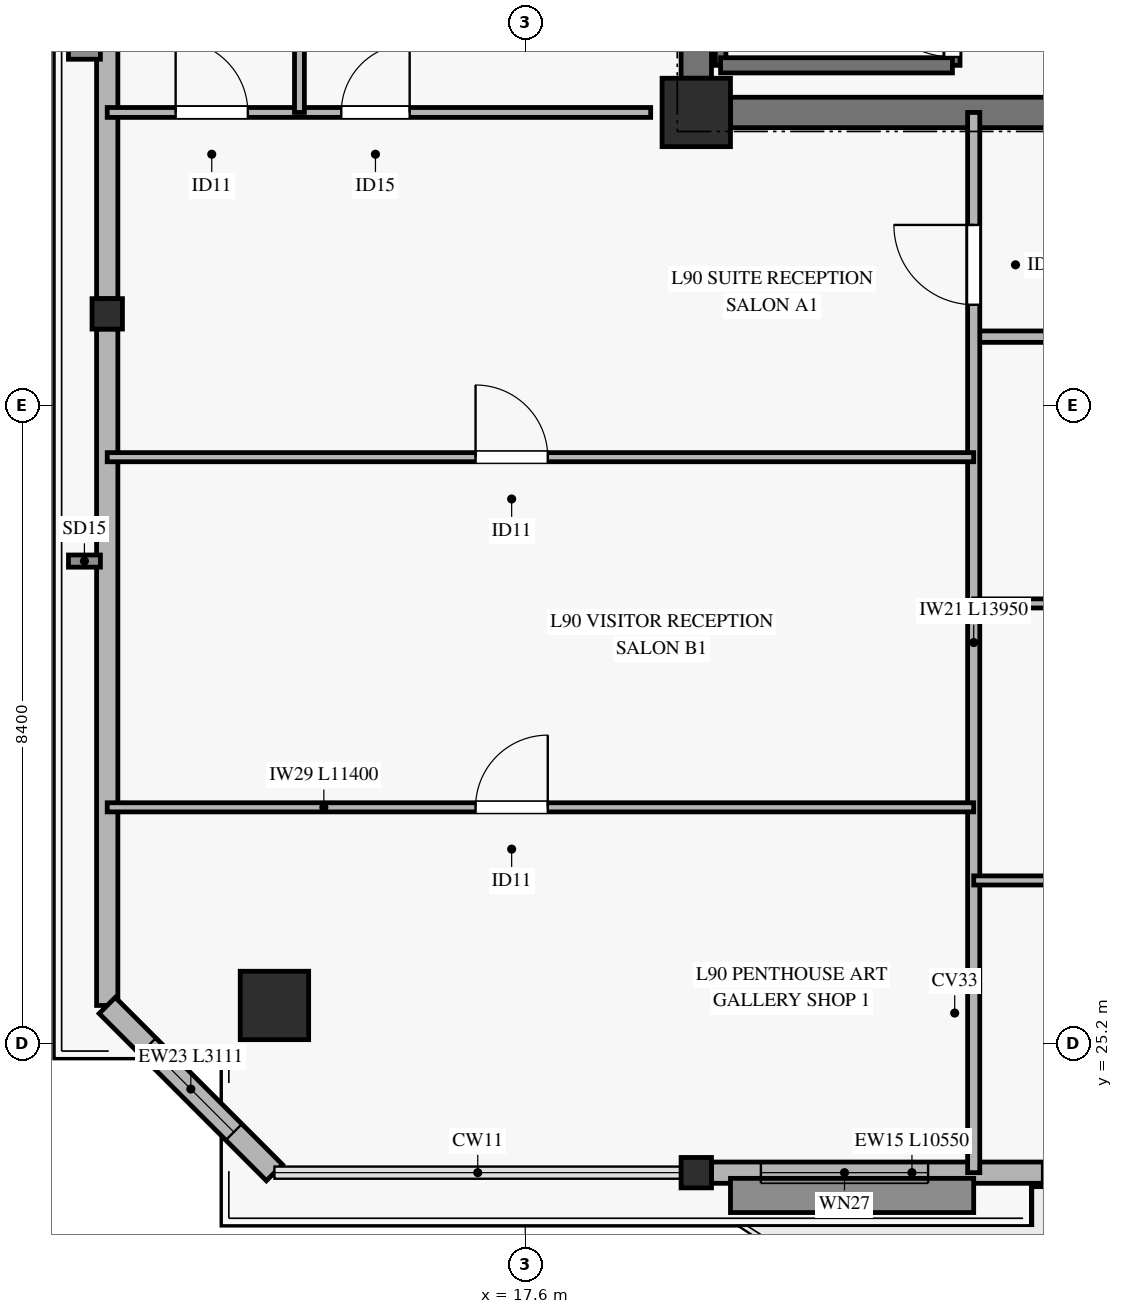
"""IFC4 building model, lengths in metres.
Left out: names, types, materials, properties, quantities, classifications, styles, units other than length and angle.
Written with IfcOpenShell. Run it as: python <this file> out.ifc"""

import sys

from ifc_helpers import new_model, si_unit, direction, frame, frame_2d, origin, origin_2d, place, context, subcontext, project, spatial, rectangle, hollow_rectangle, extrude, source, transform, mapped, element, fill, save


model = new_model("IFC4")
c1 = context("Model", 3, precision=1e-05, world=origin(), true_north=direction((0.0, 1.0)))
c2 = subcontext(c1, "Body", "Model", "MODEL_VIEW")
j1 = project(units=[si_unit("LENGTHUNIT", "METRE"), si_unit("PLANEANGLEUNIT", "RADIAN")], contexts=[c1])
p1 = place(None, origin())
s1 = spatial("IfcSite", under=j1, at=p1, CompositionType="ELEMENT")
p2 = place(p1, origin())
s2 = spatial("IfcBuilding", under=s1, at=p2, CompositionType="ELEMENT")
p3 = place(p2, frame((0.0, 0.0, 345.9)))
s3 = spatial("IfcBuildingStorey", under=s2, at=p3, CompositionType="ELEMENT", Elevation=345.9)
m1 = source(origin(), c2, "Body", "SweptSolid", [
    extrude(rectangle(XDim=0.9, YDim=0.9, at=origin_2d()), origin(), (0.0, 0.0, 1.0), 3.185),
])
p4 = place(p3, frame((19.85, 37.45, 0.0), z_axis=(0.0, 0.0, 1.0), x_axis=(1.0, 0.0, 0.0)))
e1 = element("IfcColumn", 1, at=p4, inside=s3, PredefinedType="PILASTER", context=c2, shape_type="MappedRepresentation", body=[
    mapped(m1, transform((0.0, 0.0, 0.0), x_axis=(1.0, 0.0, 0.0), y_axis=(0.0, 1.0, 0.0), z_axis=(0.0, 0.0, 1.0), scale=1.0)),
])
p5 = place(p3, frame((20.3, 37.45, 0.0), z_axis=(0.0, 0.0, 1.0), x_axis=(1.0, 0.0, 0.0)))
e2 = element("IfcWall", 2, at=p5, inside=s3, PredefinedType="SHEAR", context=c2, shape_type="SweptSolid", body=[
    extrude(rectangle(XDim=10.05, YDim=0.4, at=frame_2d((5.025, 0.0))), origin(), (0.0, 0.0, 1.0), 3.185),
])
p6 = place(p5, frame((4.25, 0.0, 0.0)))
e3 = element("IfcOpeningElement", 3, at=p6, cuts=e2, PredefinedType="OPENING", context=c2, shape_type="SweptSolid", body=[
    extrude(rectangle(XDim=1.2, YDim=2.15, at=frame_2d((0.6, 1.075))), frame((0.0, 0.21, 0.0), z_axis=(0.0, -1.0, 0.0), x_axis=(1.0, 0.0, 0.0)), (0.0, 0.0, 1.0), 0.42),
])
p7 = place(p3, frame((19.85, 37.9, 0.0), z_axis=(0.0, 0.0, 1.0), x_axis=(0.0, 1.0, 0.0)))
e4 = element("IfcWall", 4, at=p7, inside=s3, PredefinedType="SHEAR", context=c2, shape_type="SweptSolid", body=[
    extrude(rectangle(XDim=8.2, YDim=0.4, at=frame_2d((4.1, 0.0))), origin(), (0.0, 0.0, 1.0), 3.185),
])
m2 = source(origin(), c2, "Body", "SweptSolid", [
    extrude(hollow_rectangle(XDim=0.9, YDim=0.9, WallThickness=0.04, at=origin_2d()), origin(), (0.0, 0.0, 1.0), 3.185),
])
p8 = place(p3, frame((14.3, 25.7, 0.0), z_axis=(0.0, 0.0, 1.0), x_axis=(1.0, 0.0, 0.0)))
e5 = element("IfcColumn", 5, at=p8, inside=s3, PredefinedType="COLUMN", context=c2, shape_type="MappedRepresentation", body=[
    mapped(m2, transform((0.0, 0.0, 0.0), x_axis=(1.0, 0.0, 0.0), y_axis=(0.0, 1.0, 0.0), z_axis=(0.0, 0.0, 1.0), scale=1.0)),
])
m3 = source(origin(), c2, "Body", "SweptSolid", [
    extrude(hollow_rectangle(XDim=0.4, YDim=0.4, WallThickness=0.02, at=origin_2d()), origin(), (0.0, 0.0, 1.0), 3.185),
])
for number, where, z_axis, x_axis in (
    (6, (19.85, 23.5, 0.0), (0.0, 0.0, 1.0), (1.0, 0.0, 0.0)),
    (7, (12.1, 34.8, 0.0), (0.0, 0.0, 1.0), (1.0, 0.0, 0.0)),
):
    element("IfcColumn", number, at=place(p3, frame(where, z_axis=z_axis, x_axis=x_axis)), inside=s3, PredefinedType="COLUMN", context=c2, shape_type="MappedRepresentation", body=[
        mapped(m3, transform((0.0, 0.0, 0.0), x_axis=(1.0, 0.0, 0.0), y_axis=(0.0, 1.0, 0.0), z_axis=(0.0, 0.0, 1.0), scale=1.0)),
    ])
p9 = place(p3, frame((20.05, 23.5, 0.0), z_axis=(0.0, 0.0, 1.0), x_axis=(1.0, 0.0, 0.0)))
e8 = element("IfcWall", 8, at=p9, inside=s3, PredefinedType="SOLIDWALL", context=c2, shape_type="SweptSolid", body=[
    extrude(rectangle(XDim=10.55, YDim=0.28, at=frame_2d((5.275, 0.0))), origin(), (0.0, 0.0, 1.0), 2.815),
])
p10 = place(p9, frame((4.35, 0.0, 0.0)))
e9 = element("IfcOpeningElement", 9, at=p10, cuts=e8, PredefinedType="OPENING", context=c2, shape_type="SweptSolid", body=[
    extrude(rectangle(XDim=1.8, YDim=2.25, at=frame_2d((0.9, 1.125))), frame((0.0, 0.15, 0.0), z_axis=(0.0, -1.0, 0.0), x_axis=(1.0, 0.0, 0.0)), (0.0, 0.0, 1.0), 0.3),
])
p11 = place(p9, frame((0.65, 0.0, 0.45)))
e10 = element("IfcOpeningElement", 10, at=p11, cuts=e8, PredefinedType="OPENING", context=c2, shape_type="SweptSolid", body=[
    extrude(rectangle(XDim=2.2, YDim=2.1, at=frame_2d((1.1, 1.05))), frame((0.0, 0.15, 0.0), z_axis=(0.0, -1.0, 0.0), x_axis=(1.0, 0.0, 0.0)), (0.0, 0.0, 1.0), 0.3),
])
p12 = place(p9, frame((7.35, 0.0, 0.45)))
e11 = element("IfcOpeningElement", 11, at=p12, cuts=e8, PredefinedType="OPENING", context=c2, shape_type="SweptSolid", body=[
    extrude(rectangle(XDim=1.6, YDim=2.0, at=frame_2d((0.8, 1.0))), frame((0.0, 0.15, 0.0), z_axis=(0.0, -1.0, 0.0), x_axis=(1.0, 0.0, 0.0)), (0.0, 0.0, 1.0), 0.3),
])
p13 = place(p3, frame((12.1, 25.7, 0.0), z_axis=(0.0, 0.0, 1.0), x_axis=(0.0, 1.0, 0.0)))
e12 = element("IfcWall", 12, at=p13, inside=s3, PredefinedType="SOLIDWALL", context=c2, shape_type="SweptSolid", body=[
    extrude(rectangle(XDim=8.9, YDim=0.28, at=frame_2d((4.45, 0.0))), origin(), (0.0, 0.0, 1.0), 2.815),
])
p14 = place(p3, frame((12.1, 35.0, 0.0), z_axis=(0.0, 0.0, 1.0), x_axis=(0.0, 1.0, 0.0)))
e13 = element("IfcWall", 13, at=p14, inside=s3, PredefinedType="SOLIDWALL", context=c2, shape_type="SweptSolid", body=[
    extrude(rectangle(XDim=8.9, YDim=0.28, at=frame_2d((4.45, 0.0))), origin(), (0.0, 0.0, 1.0), 2.815),
])
p15 = place(p14, frame((3.35, 0.0, 0.45)))
e14 = element("IfcOpeningElement", 14, at=p15, cuts=e13, PredefinedType="OPENING", context=c2, shape_type="SweptSolid", body=[
    extrude(rectangle(XDim=2.2, YDim=2.1, at=frame_2d((1.1, 1.05))), frame((0.0, 0.15, 0.0), z_axis=(0.0, -1.0, 0.0), x_axis=(1.0, 0.0, 0.0)), (0.0, 0.0, 1.0), 0.3),
])
p16 = place(p3, frame((12.1, 25.7, 0.0), z_axis=(0.0, 0.0, 1.0), x_axis=(0.707106781187, -0.707106781187, 0.0)))
e15 = element("IfcWall", 15, at=p16, inside=s3, PredefinedType="SOLIDWALL", context=c2, shape_type="SweptSolid", body=[
    extrude(rectangle(XDim=3.111, YDim=0.3, at=frame_2d((1.556, 0.0))), origin(), (0.0, 0.0, 1.0), 2.815),
])
p17 = place(p16, frame((0.756, 0.0, 0.45)))
e16 = element("IfcOpeningElement", 16, at=p17, cuts=e15, PredefinedType="OPENING", context=c2, shape_type="SweptSolid", body=[
    extrude(rectangle(XDim=1.6, YDim=2.0, at=frame_2d((0.8, 1.0))), frame((0.0, 0.16, 0.0), z_axis=(0.0, -1.0, 0.0), x_axis=(1.0, 0.0, 0.0)), (0.0, 0.0, 1.0), 0.32),
])
p18 = place(p3, frame((20.17, 38.07, 0.0), z_axis=(0.0, 0.0, 1.0), x_axis=(0.0, 1.0, 0.0)))
e17 = element("IfcWall", 17, at=p18, inside=s3, PredefinedType="SOLIDWALL", context=c2, shape_type="SweptSolid", body=[
    extrude(rectangle(XDim=7.25, YDim=0.14, at=frame_2d((3.625, 0.0))), origin(), (0.0, 0.0, 1.0), 3.4),
])
p19 = place(p3, frame((23.22, 38.07, 0.0), z_axis=(0.0, 0.0, 1.0), x_axis=(0.0, 1.0, 0.0)))
e18 = element("IfcWall", 18, at=p19, inside=s3, PredefinedType="SOLIDWALL", context=c2, shape_type="SweptSolid", body=[
    extrude(rectangle(XDim=7.25, YDim=0.2, at=frame_2d((3.625, 0.0))), origin(), (0.0, 0.0, 1.0), 3.4),
])
p20 = place(p19, frame((0.11, 0.0, 0.0)))
e19 = element("IfcOpeningElement", 19, at=p20, cuts=e18, PredefinedType="OPENING", context=c2, shape_type="SweptSolid", body=[
    extrude(rectangle(XDim=1.1, YDim=2.15, at=frame_2d((0.55, 1.075))), frame((0.0, 0.11, 0.0), z_axis=(0.0, -1.0, 0.0), x_axis=(1.0, 0.0, 0.0)), (0.0, 0.0, 1.0), 0.22),
])
p21 = place(p3, frame((20.17, 38.07, 0.0), z_axis=(0.0, 0.0, 1.0), x_axis=(1.0, 0.0, 0.0)))
e20 = element("IfcWall", 20, at=p21, inside=s3, PredefinedType="SOLIDWALL", context=c2, shape_type="SweptSolid", body=[
    extrude(rectangle(XDim=3.05, YDim=0.2, at=frame_2d((1.525, 0.0))), origin(), (0.0, 0.0, 1.0), 3.4),
])
p22 = place(p3, frame((23.5, 34.5, 0.0), z_axis=(0.0, 0.0, 1.0), x_axis=(1.0, 0.0, 0.0)))
e21 = element("IfcWall", 21, at=p22, inside=s3, PredefinedType="PARTITIONING", context=c2, shape_type="SweptSolid", body=[
    extrude(rectangle(XDim=20.8, YDim=0.15, at=frame_2d((10.4, 0.0))), origin(), (0.0, 0.0, 1.0), 2.47),
])
p23 = place(p22, frame((4.767, 0.0, 0.0)))
e22 = element("IfcOpeningElement", 22, at=p23, cuts=e21, PredefinedType="OPENING", context=c2, shape_type="SweptSolid", body=[
    extrude(rectangle(XDim=1.05, YDim=2.15, at=frame_2d((0.525, 1.075))), frame((0.0, 0.085, 0.0), z_axis=(0.0, -1.0, 0.0), x_axis=(1.0, 0.0, 0.0)), (0.0, 0.0, 1.0), 0.17),
])
p24 = place(p22, frame((16.025, 0.0, 0.0)))
e23 = element("IfcOpeningElement", 23, at=p24, cuts=e21, PredefinedType="OPENING", context=c2, shape_type="SweptSolid", body=[
    extrude(rectangle(XDim=1.05, YDim=2.15, at=frame_2d((0.525, 1.075))), frame((0.0, 0.085, 0.0), z_axis=(0.0, -1.0, 0.0), x_axis=(1.0, 0.0, 0.0)), (0.0, 0.0, 1.0), 0.17),
])
p25 = place(p3, frame((23.5, 23.5, 0.0), z_axis=(0.0, 0.0, 1.0), x_axis=(0.0, 1.0, 0.0)))
e24 = element("IfcWall", 24, at=p25, inside=s3, PredefinedType="PARTITIONING", context=c2, shape_type="SweptSolid", body=[
    extrude(rectangle(XDim=13.95, YDim=0.16, at=frame_2d((6.975, 0.0))), origin(), (0.0, 0.0, 1.0), 2.77),
])
p26 = place(p25, frame((11.42, 0.0, 0.0)))
e25 = element("IfcOpeningElement", 25, at=p26, cuts=e24, PredefinedType="OPENING", context=c2, shape_type="SweptSolid", body=[
    extrude(rectangle(XDim=1.05, YDim=2.15, at=frame_2d((0.525, 1.075))), frame((0.0, 0.09, 0.0), z_axis=(0.0, -1.0, 0.0), x_axis=(1.0, 0.0, 0.0)), (0.0, 0.0, 1.0), 0.18),
])
p27 = place(p3, frame((12.1, 28.307, 0.0), z_axis=(0.0, 0.0, 1.0), x_axis=(1.0, 0.0, 0.0)))
e26 = element("IfcWall", 26, at=p27, inside=s3, PredefinedType="PARTITIONING", context=c2, shape_type="SweptSolid", body=[
    extrude(rectangle(XDim=11.4, YDim=0.12, at=frame_2d((5.7, 0.0))), origin(), (0.0, 0.0, 1.0), 2.47),
])
p28 = place(p27, frame((4.846, 0.0, 0.0)))
e27 = element("IfcOpeningElement", 27, at=p28, cuts=e26, PredefinedType="OPENING", context=c2, shape_type="SweptSolid", body=[
    extrude(rectangle(XDim=0.95, YDim=2.1, at=frame_2d((0.475, 1.05))), frame((0.0, 0.07, 0.0), z_axis=(0.0, -1.0, 0.0), x_axis=(1.0, 0.0, 0.0)), (0.0, 0.0, 1.0), 0.14),
])
p29 = place(p3, frame((12.1, 32.914, 0.0), z_axis=(0.0, 0.0, 1.0), x_axis=(1.0, 0.0, 0.0)))
e28 = element("IfcWall", 28, at=p29, inside=s3, PredefinedType="PARTITIONING", context=c2, shape_type="SweptSolid", body=[
    extrude(rectangle(XDim=11.4, YDim=0.12, at=frame_2d((5.7, 0.0))), origin(), (0.0, 0.0, 1.0), 2.47),
])
p30 = place(p29, frame((4.846, 0.0, 0.0)))
e29 = element("IfcOpeningElement", 29, at=p30, cuts=e28, PredefinedType="OPENING", context=c2, shape_type="SweptSolid", body=[
    extrude(rectangle(XDim=0.95, YDim=2.1, at=frame_2d((0.475, 1.05))), frame((0.0, 0.07, 0.0), z_axis=(0.0, -1.0, 0.0), x_axis=(1.0, 0.0, 0.0)), (0.0, 0.0, 1.0), 0.14),
])
p31 = place(p3, frame((23.5, 27.345, 0.0), z_axis=(0.0, 0.0, 1.0), x_axis=(1.0, 0.0, 0.0)))
e30 = element("IfcWall", 30, at=p31, inside=s3, PredefinedType="PARTITIONING", context=c2, shape_type="SweptSolid", body=[
    extrude(rectangle(XDim=12.1, YDim=0.12, at=frame_2d((6.05, 0.0))), origin(), (0.0, 0.0, 1.0), 2.47),
])
p32 = place(p31, frame((5.006, 0.0, 0.0)))
e31 = element("IfcOpeningElement", 31, at=p32, cuts=e30, PredefinedType="OPENING", context=c2, shape_type="SweptSolid", body=[
    extrude(rectangle(XDim=0.95, YDim=2.1, at=frame_2d((0.475, 1.05))), frame((0.0, 0.07, 0.0), z_axis=(0.0, -1.0, 0.0), x_axis=(1.0, 0.0, 0.0)), (0.0, 0.0, 1.0), 0.14),
])
p33 = place(p3, frame((23.5, 30.99, 0.0), z_axis=(0.0, 0.0, 1.0), x_axis=(1.0, 0.0, 0.0)))
e32 = element("IfcWall", 32, at=p33, inside=s3, PredefinedType="PARTITIONING", context=c2, shape_type="SweptSolid", body=[
    extrude(rectangle(XDim=12.1, YDim=0.12, at=frame_2d((6.05, 0.0))), origin(), (0.0, 0.0, 1.0), 2.47),
])
p34 = place(p33, frame((5.006, 0.0, 0.0)))
e33 = element("IfcOpeningElement", 33, at=p34, cuts=e32, PredefinedType="OPENING", context=c2, shape_type="SweptSolid", body=[
    extrude(rectangle(XDim=0.95, YDim=2.1, at=frame_2d((0.475, 1.05))), frame((0.0, 0.07, 0.0), z_axis=(0.0, -1.0, 0.0), x_axis=(1.0, 0.0, 0.0)), (0.0, 0.0, 1.0), 0.14),
])
p35 = place(p3, frame((12.1, 37.45, 0.0), z_axis=(0.0, 0.0, 1.0), x_axis=(1.0, 0.0, 0.0)))
e34 = element("IfcWall", 34, at=p35, inside=s3, PredefinedType="PARTITIONING", context=c2, shape_type="SweptSolid", body=[
    extrude(rectangle(XDim=7.15, YDim=0.13, at=frame_2d((3.575, 0.0))), origin(), (0.0, 0.0, 1.0), 2.82),
])
p36 = place(p35, frame((0.9, 0.0, 0.0)))
e35 = element("IfcOpeningElement", 35, at=p36, cuts=e34, PredefinedType="OPENING", context=c2, shape_type="SweptSolid", body=[
    extrude(rectangle(XDim=0.95, YDim=2.1, at=frame_2d((0.475, 1.05))), frame((0.0, 0.075, 0.0), z_axis=(0.0, -1.0, 0.0), x_axis=(1.0, 0.0, 0.0)), (0.0, 0.0, 1.0), 0.15),
])
p37 = place(p35, frame((3.079, 0.0, 0.0)))
e36 = element("IfcOpeningElement", 36, at=p37, cuts=e34, PredefinedType="OPENING", context=c2, shape_type="SweptSolid", body=[
    extrude(rectangle(XDim=0.9, YDim=2.1, at=frame_2d((0.45, 1.05))), frame((0.0, 0.075, 0.0), z_axis=(0.0, -1.0, 0.0), x_axis=(1.0, 0.0, 0.0)), (0.0, 0.0, 1.0), 0.15),
])
p38 = place(p3, frame((14.629, 37.45, 0.0), z_axis=(0.0, 0.0, 1.0), x_axis=(0.0, 1.0, 0.0)))
e37 = element("IfcWall", 37, at=p38, inside=s3, PredefinedType="PARTITIONING", context=c2, shape_type="SweptSolid", body=[
    extrude(rectangle(XDim=8.8, YDim=0.13, at=frame_2d((4.4, 0.0))), origin(), (0.0, 0.0, 1.0), 2.82),
])
m4 = source(origin(), c2, "Body", "SweptSolid", [
    extrude(rectangle(XDim=1.8, YDim=2.25, at=frame_2d((0.9, 1.125))), frame((0.0, 0.025, 0.0), z_axis=(0.0, -1.0, 0.0), x_axis=(1.0, 0.0, 0.0)), (0.0, 0.0, 1.0), 0.05),
])
p39 = place(p10, origin())
e38 = element("IfcDoor", 38, at=p39, inside=s3, OperationType="SLIDING_TO_LEFT", PredefinedType="DOOR", context=c2, shape_type="MappedRepresentation", body=[
    mapped(m4, transform((0.0, 0.0, 0.0), x_axis=(1.0, 0.0, 0.0), y_axis=(0.0, 1.0, 0.0), z_axis=(0.0, 0.0, 1.0), scale=1.0)),
])
fill(e9, e38)
m5 = source(origin(), c2, "Body", "SweptSolid", [
    extrude(rectangle(XDim=2.2, YDim=2.1, at=frame_2d((1.1, 1.05))), frame((0.0, 0.03, 0.0), z_axis=(0.0, -1.0, 0.0), x_axis=(1.0, 0.0, 0.0)), (0.0, 0.0, 1.0), 0.06),
])
p40 = place(p11, origin())
e39 = element("IfcWindow", 39, at=p40, inside=s3, PartitioningType="SINGLE_PANEL", PredefinedType="WINDOW", context=c2, shape_type="MappedRepresentation", body=[
    mapped(m5, transform((0.0, 0.0, 0.0), x_axis=(1.0, 0.0, 0.0), y_axis=(0.0, 1.0, 0.0), z_axis=(0.0, 0.0, 1.0), scale=1.0)),
])
fill(e10, e39)
m6 = source(origin(), c2, "Body", "SweptSolid", [
    extrude(rectangle(XDim=1.6, YDim=2.0, at=frame_2d((0.8, 1.0))), frame((0.0, 0.03, 0.0), z_axis=(0.0, -1.0, 0.0), x_axis=(1.0, 0.0, 0.0)), (0.0, 0.0, 1.0), 0.06),
])
p41 = place(p17, origin())
e40 = element("IfcWindow", 40, at=p41, inside=s3, PartitioningType="SINGLE_PANEL", PredefinedType="WINDOW", context=c2, shape_type="MappedRepresentation", body=[
    mapped(m6, transform((0.0, 0.0, 0.0), x_axis=(1.0, 0.0, 0.0), y_axis=(0.0, 1.0, 0.0), z_axis=(0.0, 0.0, 1.0), scale=1.0)),
])
fill(e16, e40)
m7 = source(origin(), c2, "Body", "SweptSolid", [
    extrude(rectangle(XDim=1.1, YDim=2.15, at=frame_2d((0.55, 1.075))), frame((0.0, 0.025, 0.0), z_axis=(0.0, -1.0, 0.0), x_axis=(1.0, 0.0, 0.0)), (0.0, 0.0, 1.0), 0.05),
])
p42 = place(p20, origin())
e41 = element("IfcDoor", 41, at=p42, inside=s3, OperationType="SINGLE_SWING_RIGHT", PredefinedType="DOOR", context=c2, shape_type="MappedRepresentation", body=[
    mapped(m7, transform((0.0, 0.0, 0.0), x_axis=(1.0, 0.0, 0.0), y_axis=(0.0, 1.0, 0.0), z_axis=(0.0, 0.0, 1.0), scale=1.0)),
])
fill(e19, e41)
m8 = source(origin(), c2, "Body", "SweptSolid", [
    extrude(rectangle(XDim=1.05, YDim=2.15, at=frame_2d((0.525, 1.075))), frame((0.0, 0.025, 0.0), z_axis=(0.0, -1.0, 0.0), x_axis=(1.0, 0.0, 0.0)), (0.0, 0.0, 1.0), 0.05),
])
p43 = place(p26, origin())
e42 = element("IfcDoor", 42, at=p43, inside=s3, OperationType="SINGLE_SWING_RIGHT", PredefinedType="DOOR", context=c2, shape_type="MappedRepresentation", body=[
    mapped(m8, transform((0.0, 0.0, 0.0), x_axis=(1.0, 0.0, 0.0), y_axis=(0.0, 1.0, 0.0), z_axis=(0.0, 0.0, 1.0), scale=1.0)),
])
fill(e25, e42)
m9 = source(origin(), c2, "Body", "SweptSolid", [
    extrude(rectangle(XDim=0.95, YDim=2.1, at=frame_2d((0.475, 1.05))), frame((0.0, 0.025, 0.0), z_axis=(0.0, -1.0, 0.0), x_axis=(1.0, 0.0, 0.0)), (0.0, 0.0, 1.0), 0.05),
])
p44 = place(p30, origin())
e43 = element("IfcDoor", 43, at=p44, inside=s3, OperationType="SINGLE_SWING_LEFT", PredefinedType="DOOR", context=c2, shape_type="MappedRepresentation", body=[
    mapped(m9, transform((0.0, 0.0, 0.0), x_axis=(1.0, 0.0, 0.0), y_axis=(0.0, 1.0, 0.0), z_axis=(0.0, 0.0, 1.0), scale=1.0)),
])
fill(e29, e43)
p45 = place(p28, origin())
e44 = element("IfcDoor", 44, at=p45, inside=s3, OperationType="SINGLE_SWING_RIGHT", PredefinedType="DOOR", context=c2, shape_type="MappedRepresentation", body=[
    mapped(m9, transform((0.0, 0.0, 0.0), x_axis=(1.0, 0.0, 0.0), y_axis=(0.0, 1.0, 0.0), z_axis=(0.0, 0.0, 1.0), scale=1.0)),
])
fill(e27, e44)
p46 = place(p36, origin())
e45 = element("IfcDoor", 45, at=p46, inside=s3, OperationType="SINGLE_SWING_LEFT", PredefinedType="DOOR", context=c2, shape_type="MappedRepresentation", body=[
    mapped(m9, transform((0.0, 0.0, 0.0), x_axis=(1.0, 0.0, 0.0), y_axis=(0.0, 1.0, 0.0), z_axis=(0.0, 0.0, 1.0), scale=1.0)),
])
fill(e35, e45)
m10 = source(origin(), c2, "Body", "SweptSolid", [
    extrude(rectangle(XDim=0.9, YDim=2.1, at=frame_2d((0.45, 1.05))), frame((0.0, 0.025, 0.0), z_axis=(0.0, -1.0, 0.0), x_axis=(1.0, 0.0, 0.0)), (0.0, 0.0, 1.0), 0.05),
])
p47 = place(p37, origin())
e46 = element("IfcDoor", 46, at=p47, inside=s3, OperationType="SINGLE_SWING_RIGHT", PredefinedType="DOOR", context=c2, shape_type="MappedRepresentation", body=[
    mapped(m10, transform((0.0, 0.0, 0.0), x_axis=(1.0, 0.0, 0.0), y_axis=(0.0, 1.0, 0.0), z_axis=(0.0, 0.0, 1.0), scale=1.0)),
])
fill(e36, e46)
save(model, sys.argv[1])
